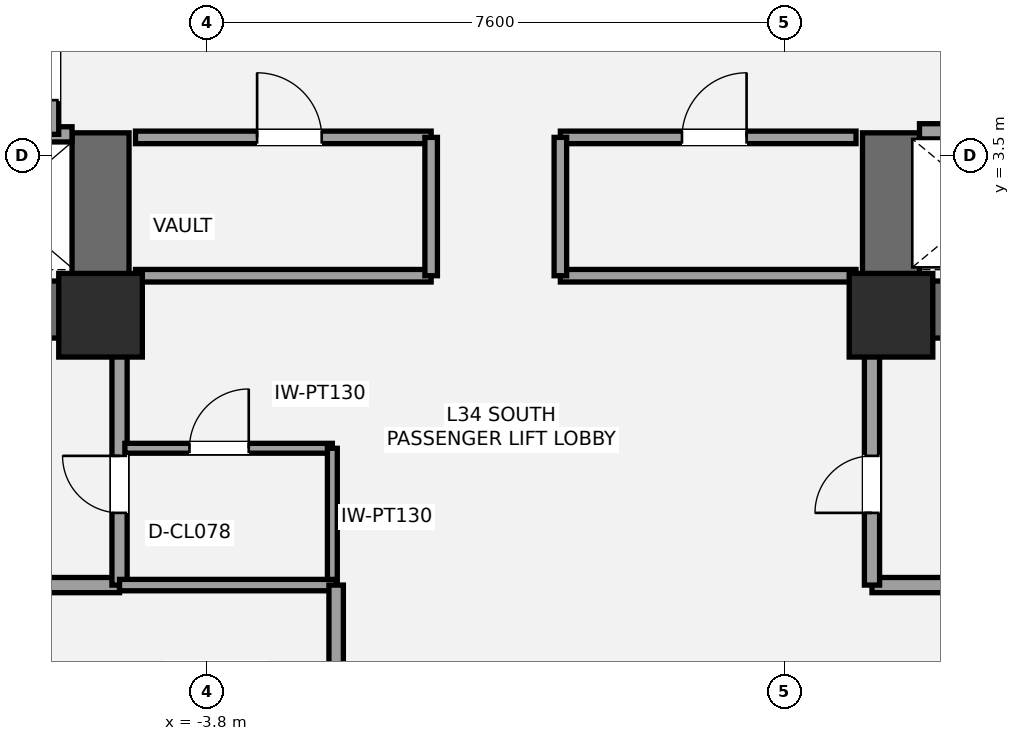
"""IFC4 building model, lengths in metres.
Left out: names, types, materials, properties, quantities, classifications, styles, units other than length and angle.
Written with IfcOpenShell. Run it as: python <this file> out.ifc"""

import sys

from ifc_helpers import new_model, si_unit, direction, frame, frame_2d, origin, origin_2d, place, context, subcontext, project, spatial, rectangle, extrude, element, fill, save


model = new_model("IFC4")
c1 = context("Model", 3, precision=1e-05, world=origin(), true_north=direction((0.0, 1.0)))
c2 = subcontext(c1, "Body", "Model", "MODEL_VIEW")
j1 = project(units=[si_unit("LENGTHUNIT", "METRE"), si_unit("PLANEANGLEUNIT", "RADIAN")], contexts=[c1])
p1 = place(None, origin())
s1 = spatial("IfcSite", under=j1, at=p1, CompositionType="ELEMENT")
p2 = place(p1, origin())
s2 = spatial("IfcBuilding", under=s1, at=p2, CompositionType="ELEMENT")
p3 = place(p2, frame((0.0, 0.0, 128.1)))
s3 = spatial("IfcBuildingStorey", under=s2, at=p3, CompositionType="ELEMENT", Elevation=128.1)
p4 = place(p3, frame((-4.825, 1.475, 0.0), z_axis=(0.0, 0.0, 1.0), x_axis=(-1.0, 0.0, 0.0)))
e1 = element("IfcWall", 1, at=p4, inside=s3, PredefinedType="SHEAR", context=c2, shape_type="SweptSolid", body=[
    extrude(rectangle(XDim=9.075, YDim=0.75, at=frame_2d((4.538, 0.0))), origin(), (0.0, 0.0, 1.0), 3.5),
])
p5 = place(p4, frame((5.475, 0.0, 0.0)))
e2 = element("IfcOpeningElement", 2, at=p5, cuts=e1, PredefinedType="OPENING", context=c2, shape_type="SweptSolid", body=[
    extrude(rectangle(XDim=1.05, YDim=2.15, at=frame_2d((0.525, 1.075))), frame((0.0, 0.385, 0.0), z_axis=(0.0, -1.0, 0.0), x_axis=(1.0, 0.0, 0.0)), (0.0, 0.0, 1.0), 0.77),
])
p6 = place(p4, frame((3.805, 0.0, 0.0)))
e3 = element("IfcOpeningElement", 3, at=p6, cuts=e1, PredefinedType="OPENING", context=c2, shape_type="SweptSolid", body=[
    extrude(rectangle(XDim=1.1, YDim=2.2, at=frame_2d((0.55, 1.1))), frame((0.0, 0.385, 0.0), z_axis=(0.0, -1.0, 0.0), x_axis=(1.0, 0.0, 0.0)), (0.0, 0.0, 1.0), 0.77),
])
p7 = place(p3, frame((-5.2, 1.1, 0.0), z_axis=(0.0, 0.0, 1.0), x_axis=(0.0, 1.0, 0.0)))
e4 = element("IfcWall", 4, at=p7, inside=s3, PredefinedType="SHEAR", context=c2, shape_type="SweptSolid", body=[
    extrude(rectangle(XDim=2.7, YDim=0.75, at=frame_2d((1.35, 0.0))), origin(), (0.0, 0.0, 1.0), 3.5),
])
p8 = place(p3, frame((13.9, 1.475, 0.0), z_axis=(0.0, 0.0, 1.0), x_axis=(-1.0, 0.0, 0.0)))
e5 = element("IfcWall", 5, at=p8, inside=s3, PredefinedType="SHEAR", context=c2, shape_type="SweptSolid", body=[
    extrude(rectangle(XDim=9.075, YDim=0.75, at=frame_2d((4.538, 0.0))), origin(), (0.0, 0.0, 1.0), 3.5),
])
p9 = place(p8, frame((2.55, 0.0, 0.0)))
e6 = element("IfcOpeningElement", 6, at=p9, cuts=e5, PredefinedType="OPENING", context=c2, shape_type="SweptSolid", body=[
    extrude(rectangle(XDim=1.05, YDim=2.15, at=frame_2d((0.525, 1.075))), frame((0.0, 0.385, 0.0), z_axis=(0.0, -1.0, 0.0), x_axis=(1.0, 0.0, 0.0)), (0.0, 0.0, 1.0), 0.77),
])
p10 = place(p8, frame((4.55, 0.0, 0.0)))
e7 = element("IfcOpeningElement", 7, at=p10, cuts=e5, PredefinedType="OPENING", context=c2, shape_type="SweptSolid", body=[
    extrude(rectangle(XDim=1.1, YDim=2.2, at=frame_2d((0.55, 1.1))), frame((0.0, 0.385, 0.0), z_axis=(0.0, -1.0, 0.0), x_axis=(1.0, 0.0, 0.0)), (0.0, 0.0, 1.0), 0.77),
])
p11 = place(p3, frame((5.2, 1.1, 0.0), z_axis=(0.0, 0.0, 1.0), x_axis=(0.0, 1.0, 0.0)))
e8 = element("IfcWall", 8, at=p11, inside=s3, PredefinedType="SHEAR", context=c2, shape_type="SweptSolid", body=[
    extrude(rectangle(XDim=2.7, YDim=0.75, at=frame_2d((1.35, 0.0))), origin(), (0.0, 0.0, 1.0), 3.5),
])
for number, where, z_axis, x_axis in (
    (9, (-5.2, 1.4, 0.0), (0.0, 0.0, 1.0), (1.0, 0.0, 0.0)),
    (10, (5.2, 1.4, 0.0), (0.0, 0.0, 1.0), (1.0, 0.0, 0.0)),
):
    element("IfcColumn", number, at=place(p3, frame(where, z_axis=z_axis, x_axis=x_axis)), inside=s3, PredefinedType="COLUMN", context=c2, shape_type="SweptSolid", body=[
        extrude(rectangle(XDim=1.1, YDim=1.1, at=origin_2d()), origin(), (0.0, 0.0, 1.0), 3.5),
    ])
p12 = place(p3, frame((-7.2, -2.15, 0.0), z_axis=(0.0, 0.0, 1.0), x_axis=(1.0, 0.0, 0.0)))
e11 = element("IfcWall", 11, at=p12, inside=s3, PredefinedType="SOLIDWALL", context=c2, shape_type="SweptSolid", body=[
    extrude(rectangle(XDim=2.25, YDim=0.2, at=frame_2d((1.125, 0.0))), origin(), (0.0, 0.0, 1.0), 3.31),
])
p13 = place(p3, frame((-4.95, -2.15, 0.0), z_axis=(0.0, 0.0, 1.0), x_axis=(0.0, 1.0, 0.0)))
e12 = element("IfcWall", 12, at=p13, inside=s3, PredefinedType="SOLIDWALL", context=c2, shape_type="SweptSolid", body=[
    extrude(rectangle(XDim=3.3, YDim=0.2, at=frame_2d((1.65, 0.0))), origin(), (0.0, 0.0, 1.0), 2.763),
])
p14 = place(p13, frame((0.95, 0.0, 0.0)))
e13 = element("IfcOpeningElement", 13, at=p14, cuts=e12, PredefinedType="OPENING", context=c2, shape_type="SweptSolid", body=[
    extrude(rectangle(XDim=0.75, YDim=2.1, at=frame_2d((0.375, 1.05))), frame((0.0, 0.11, 0.0), z_axis=(0.0, -1.0, 0.0), x_axis=(1.0, 0.0, 0.0)), (0.0, 0.0, 1.0), 0.22),
])
p15 = place(p3, frame((4.95, -2.15, 0.0), z_axis=(0.0, 0.0, 1.0), x_axis=(1.0, 0.0, 0.0)))
e14 = element("IfcWall", 14, at=p15, inside=s3, PredefinedType="SOLIDWALL", context=c2, shape_type="SweptSolid", body=[
    extrude(rectangle(XDim=2.25, YDim=0.2, at=frame_2d((1.125, 0.0))), origin(), (0.0, 0.0, 1.0), 3.31),
])
p16 = place(p3, frame((4.95, -2.15, 0.0), z_axis=(0.0, 0.0, 1.0), x_axis=(0.0, 1.0, 0.0)))
e15 = element("IfcWall", 15, at=p16, inside=s3, PredefinedType="SOLIDWALL", context=c2, shape_type="SweptSolid", body=[
    extrude(rectangle(XDim=3.3, YDim=0.2, at=frame_2d((1.65, 0.0))), origin(), (0.0, 0.0, 1.0), 2.763),
])
p17 = place(p16, frame((0.95, 0.0, 0.0)))
e16 = element("IfcOpeningElement", 16, at=p17, cuts=e15, PredefinedType="OPENING", context=c2, shape_type="SweptSolid", body=[
    extrude(rectangle(XDim=0.75, YDim=2.1, at=frame_2d((0.375, 1.05))), frame((0.0, 0.11, 0.0), z_axis=(0.0, -1.0, 0.0), x_axis=(1.0, 0.0, 0.0)), (0.0, 0.0, 1.0), 0.22),
])
p18 = place(p3, frame((-4.88, -0.35, 0.0), z_axis=(0.0, 0.0, 1.0), x_axis=(1.0, 0.0, 0.0)))
e17 = element("IfcWall", 17, at=p18, inside=s3, PredefinedType="PARTITIONING", context=c2, shape_type="SweptSolid", body=[
    extrude(rectangle(XDim=2.73, YDim=0.13, at=frame_2d((1.365, 0.0))), origin(), (0.0, 0.0, 1.0), 2.763),
])
p19 = place(p18, frame((0.85, 0.0, 0.0)))
e18 = element("IfcOpeningElement", 18, at=p19, cuts=e17, PredefinedType="OPENING", context=c2, shape_type="SweptSolid", body=[
    extrude(rectangle(XDim=0.78, YDim=2.1, at=frame_2d((0.39, 1.05))), frame((0.0, 0.075, 0.0), z_axis=(0.0, -1.0, 0.0), x_axis=(1.0, 0.0, 0.0)), (0.0, 0.0, 1.0), 0.15),
])
p20 = place(p3, frame((-2.15, -2.15, 0.0), z_axis=(0.0, 0.0, 1.0), x_axis=(0.0, 1.0, 0.0)))
e19 = element("IfcWall", 19, at=p20, inside=s3, PredefinedType="PARTITIONING", context=c2, shape_type="SweptSolid", body=[
    extrude(rectangle(XDim=1.8, YDim=0.13, at=frame_2d((0.9, 0.0))), origin(), (0.0, 0.0, 1.0), 2.763),
])
p21 = place(p3, frame((-9.78, 3.78, 0.0), z_axis=(0.0, 0.0, 1.0), x_axis=(1.0, 0.0, 0.0)))
e20 = element("IfcWall", 20, at=p21, inside=s3, PredefinedType="SOLIDWALL", context=c2, shape_type="SweptSolid", body=[
    extrude(rectangle(XDim=4.205, YDim=0.2, at=frame_2d((2.103, 0.0))), origin(), (0.0, 0.0, 1.0), 3.31),
])
p22 = place(p3, frame((-5.85, 3.78, 0.0), z_axis=(0.0, 0.0, 1.0), x_axis=(0.0, 1.0, 0.0)))
e21 = element("IfcWall", 21, at=p22, inside=s3, PredefinedType="SOLIDWALL", context=c2, shape_type="SweptSolid", body=[
    extrude(rectangle(XDim=1.69, YDim=0.2, at=frame_2d((0.845, 0.0))), origin(), (0.0, 0.0, 1.0), 3.31),
])
p23 = place(p22, frame((0.45, 0.0, 0.0)))
e22 = element("IfcOpeningElement", 22, at=p23, cuts=e21, PredefinedType="OPENING", context=c2, shape_type="SweptSolid", body=[
    extrude(rectangle(XDim=0.75, YDim=2.1, at=frame_2d((0.375, 1.05))), frame((0.0, 0.11, 0.0), z_axis=(0.0, -1.0, 0.0), x_axis=(1.0, 0.0, 0.0)), (0.0, 0.0, 1.0), 0.22),
])
p24 = place(p3, frame((5.575, 3.82, 0.0), z_axis=(0.0, 0.0, 1.0), x_axis=(1.0, 0.0, 0.0)))
e23 = element("IfcWall", 23, at=p24, inside=s3, PredefinedType="SOLIDWALL", context=c2, shape_type="SweptSolid", body=[
    extrude(rectangle(XDim=4.205, YDim=0.2, at=frame_2d((2.103, 0.0))), origin(), (0.0, 0.0, 1.0), 3.31),
])
p25 = place(p24, frame((0.65, 0.0, 0.0)))
e24 = element("IfcOpeningElement", 24, at=p25, cuts=e23, PredefinedType="OPENING", context=c2, shape_type="SweptSolid", body=[
    extrude(rectangle(XDim=1.2, YDim=2.2, at=frame_2d((0.6, 1.1))), frame((0.0, 0.11, 0.0), z_axis=(0.0, -1.0, 0.0), x_axis=(1.0, 0.0, 0.0)), (0.0, 0.0, 1.0), 0.22),
])
p26 = place(p3, frame((-4.74, 1.92, 0.0), z_axis=(0.0, 0.0, 1.0), x_axis=(1.0, 0.0, 0.0)))
e25 = element("IfcWall", 25, at=p26, inside=s3, PredefinedType="PARTITIONING", context=c2, shape_type="SweptSolid", body=[
    extrude(rectangle(XDim=3.89, YDim=0.165, at=frame_2d((1.945, 0.0))), origin(), (0.0, 0.0, 1.0), 2.3),
])
p27 = place(p3, frame((-4.74, 3.74, 0.0), z_axis=(0.0, 0.0, 1.0), x_axis=(1.0, 0.0, 0.0)))
e26 = element("IfcWall", 26, at=p27, inside=s3, PredefinedType="PARTITIONING", context=c2, shape_type="SweptSolid", body=[
    extrude(rectangle(XDim=3.89, YDim=0.165, at=frame_2d((1.945, 0.0))), origin(), (0.0, 0.0, 1.0), 3.31),
])
p28 = place(p27, frame((1.6, 0.0, 0.0)))
e27 = element("IfcOpeningElement", 27, at=p28, cuts=e26, PredefinedType="OPENING", context=c2, shape_type="SweptSolid", body=[
    extrude(rectangle(XDim=0.85, YDim=2.1, at=frame_2d((0.425, 1.05))), frame((0.0, 0.093, 0.0), z_axis=(0.0, -1.0, 0.0), x_axis=(1.0, 0.0, 0.0)), (0.0, 0.0, 1.0), 0.185),
])
p29 = place(p3, frame((-0.85, 1.92, 0.0), z_axis=(0.0, 0.0, 1.0), x_axis=(0.0, 1.0, 0.0)))
e28 = element("IfcWall", 28, at=p29, inside=s3, PredefinedType="PARTITIONING", context=c2, shape_type="SweptSolid", body=[
    extrude(rectangle(XDim=1.82, YDim=0.165, at=frame_2d((0.91, 0.0))), origin(), (0.0, 0.0, 1.0), 3.31),
])
p30 = place(p3, frame((0.85, 1.92, 0.0), z_axis=(0.0, 0.0, 1.0), x_axis=(1.0, 0.0, 0.0)))
e29 = element("IfcWall", 29, at=p30, inside=s3, PredefinedType="PARTITIONING", context=c2, shape_type="SweptSolid", body=[
    extrude(rectangle(XDim=3.89, YDim=0.165, at=frame_2d((1.945, 0.0))), origin(), (0.0, 0.0, 1.0), 2.3),
])
p31 = place(p3, frame((0.85, 3.74, 0.0), z_axis=(0.0, 0.0, 1.0), x_axis=(1.0, 0.0, 0.0)))
e30 = element("IfcWall", 30, at=p31, inside=s3, PredefinedType="PARTITIONING", context=c2, shape_type="SweptSolid", body=[
    extrude(rectangle(XDim=3.89, YDim=0.165, at=frame_2d((1.945, 0.0))), origin(), (0.0, 0.0, 1.0), 3.31),
])
p32 = place(p31, frame((1.6, 0.0, 0.0)))
e31 = element("IfcOpeningElement", 31, at=p32, cuts=e30, PredefinedType="OPENING", context=c2, shape_type="SweptSolid", body=[
    extrude(rectangle(XDim=0.85, YDim=2.1, at=frame_2d((0.425, 1.05))), frame((0.0, 0.093, 0.0), z_axis=(0.0, -1.0, 0.0), x_axis=(1.0, 0.0, 0.0)), (0.0, 0.0, 1.0), 0.185),
])
p33 = place(p3, frame((0.85, 1.92, 0.0), z_axis=(0.0, 0.0, 1.0), x_axis=(0.0, 1.0, 0.0)))
e32 = element("IfcWall", 32, at=p33, inside=s3, PredefinedType="PARTITIONING", context=c2, shape_type="SweptSolid", body=[
    extrude(rectangle(XDim=1.82, YDim=0.165, at=frame_2d((0.91, 0.0))), origin(), (0.0, 0.0, 1.0), 3.31),
])
p34 = place(p3, frame((-4.95, -2.15, 0.0), z_axis=(0.0, 0.0, 1.0), x_axis=(1.0, 0.0, 0.0)))
e33 = element("IfcWall", 33, at=p34, inside=s3, PredefinedType="PLUMBINGWALL", context=c2, shape_type="SweptSolid", body=[
    extrude(rectangle(XDim=2.85, YDim=0.15, at=frame_2d((1.425, 0.0))), origin(), (0.0, 0.0, 1.0), 3.31),
])
p35 = place(p3, frame((-2.1, -4.05, 0.0), z_axis=(0.0, 0.0, 1.0), x_axis=(0.0, 1.0, 0.0)))
e34 = element("IfcWall", 34, at=p35, inside=s3, PredefinedType="PLUMBINGWALL", context=c2, shape_type="SweptSolid", body=[
    extrude(rectangle(XDim=1.9, YDim=0.19, at=frame_2d((0.95, 0.0))), origin(), (0.0, 0.0, 1.0), 3.31),
])
p36 = place(p14, origin())
e35 = element("IfcDoor", 35, at=p36, inside=s3, OperationType="SINGLE_SWING_RIGHT", PredefinedType="DOOR", context=c2, shape_type="SweptSolid", body=[
    extrude(rectangle(XDim=0.75, YDim=2.1, at=frame_2d((0.375, 1.05))), frame((0.0, 0.025, 0.0), z_axis=(0.0, -1.0, 0.0), x_axis=(1.0, 0.0, 0.0)), (0.0, 0.0, 1.0), 0.05),
])
fill(e13, e35)
p37 = place(p17, origin())
e36 = element("IfcDoor", 36, at=p37, inside=s3, OperationType="SINGLE_SWING_LEFT", PredefinedType="DOOR", context=c2, shape_type="SweptSolid", body=[
    extrude(rectangle(XDim=0.75, YDim=2.1, at=frame_2d((0.375, 1.05))), frame((0.0, 0.025, 0.0), z_axis=(0.0, -1.0, 0.0), x_axis=(1.0, 0.0, 0.0)), (0.0, 0.0, 1.0), 0.05),
])
fill(e16, e36)
p38 = place(p19, origin())
e37 = element("IfcDoor", 37, at=p38, inside=s3, OperationType="SINGLE_SWING_RIGHT", PredefinedType="DOOR", context=c2, shape_type="SweptSolid", body=[
    extrude(rectangle(XDim=0.78, YDim=2.1, at=frame_2d((0.39, 1.05))), frame((0.0, 0.025, 0.0), z_axis=(0.0, -1.0, 0.0), x_axis=(1.0, 0.0, 0.0)), (0.0, 0.0, 1.0), 0.05),
])
fill(e18, e37)
p39 = place(p23, origin())
e38 = element("IfcDoor", 38, at=p39, inside=s3, OperationType="SINGLE_SWING_RIGHT", PredefinedType="DOOR", context=c2, shape_type="SweptSolid", body=[
    extrude(rectangle(XDim=0.75, YDim=2.1, at=frame_2d((0.375, 1.05))), frame((0.0, 0.025, 0.0), z_axis=(0.0, -1.0, 0.0), x_axis=(1.0, 0.0, 0.0)), (0.0, 0.0, 1.0), 0.05),
])
fill(e22, e38)
p40 = place(p28, origin())
e39 = element("IfcDoor", 39, at=p40, inside=s3, OperationType="SINGLE_SWING_LEFT", PredefinedType="DOOR", context=c2, shape_type="SweptSolid", body=[
    extrude(rectangle(XDim=0.85, YDim=2.1, at=frame_2d((0.425, 1.05))), frame((0.0, 0.025, 0.0), z_axis=(0.0, -1.0, 0.0), x_axis=(1.0, 0.0, 0.0)), (0.0, 0.0, 1.0), 0.05),
])
fill(e27, e39)
p41 = place(p32, origin())
e40 = element("IfcDoor", 40, at=p41, inside=s3, OperationType="SINGLE_SWING_RIGHT", PredefinedType="DOOR", context=c2, shape_type="SweptSolid", body=[
    extrude(rectangle(XDim=0.85, YDim=2.1, at=frame_2d((0.425, 1.05))), frame((0.0, 0.025, 0.0), z_axis=(0.0, -1.0, 0.0), x_axis=(1.0, 0.0, 0.0)), (0.0, 0.0, 1.0), 0.05),
])
fill(e31, e40)
save(model, sys.argv[1])
